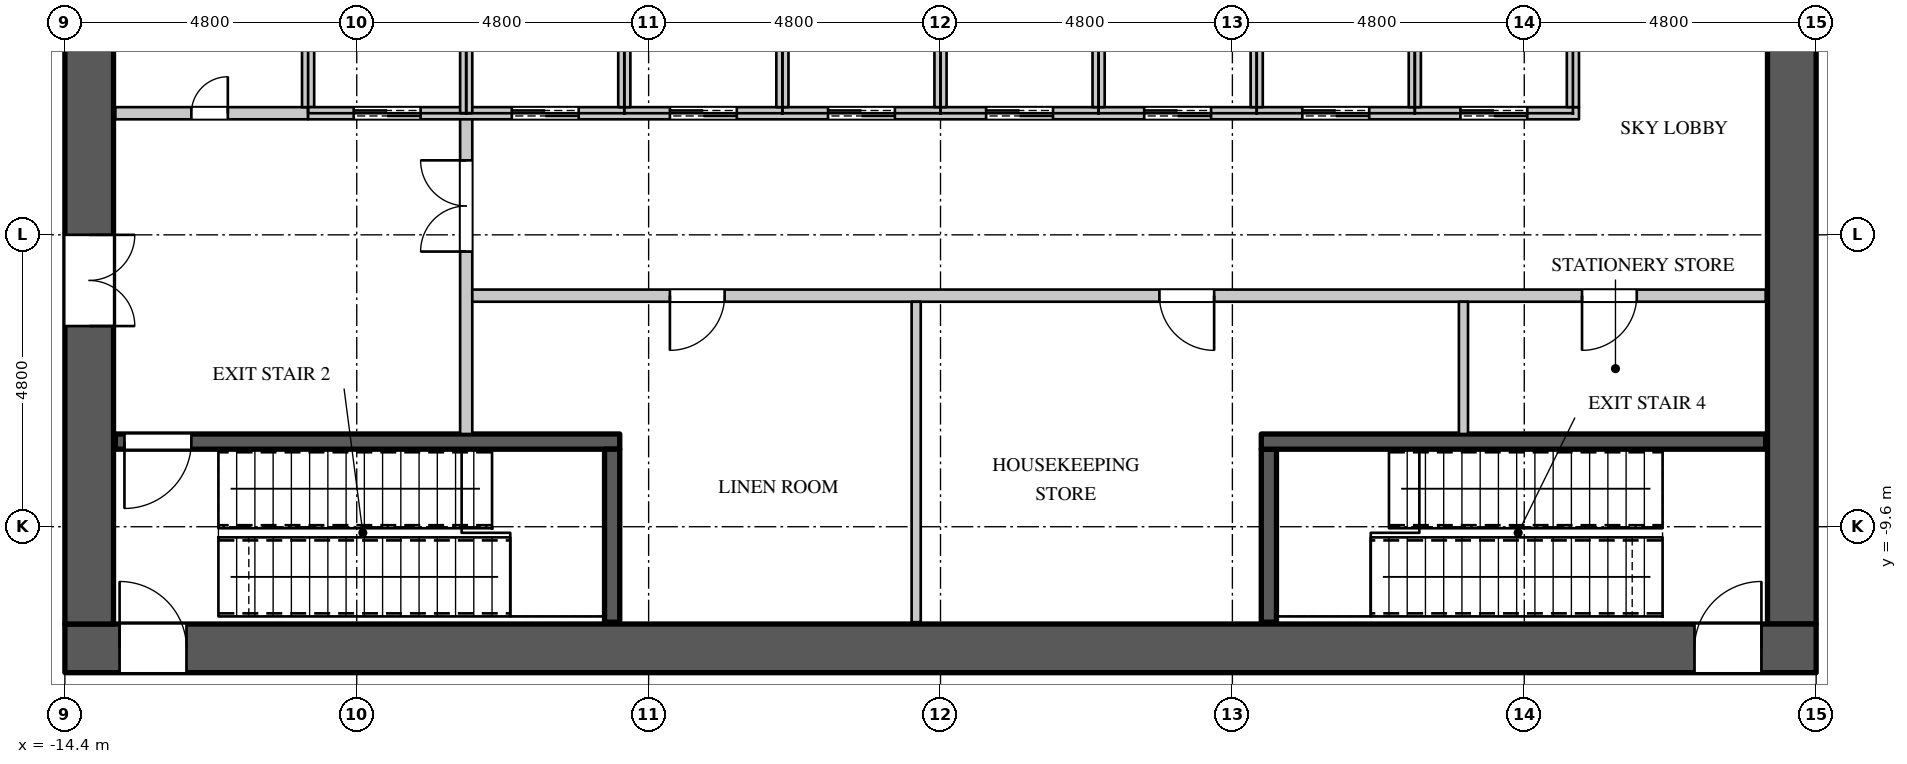
"""IFC4 building model, lengths in metres.
Left out: names, types, materials, properties, quantities, classifications, styles, units other than length and angle.
Written with IfcOpenShell. Run it as: python <this file> out.ifc"""

import sys

from ifc_helpers import new_model, si_unit, direction, frame, frame_2d, origin, place, context, subcontext, project, spatial, rectangle, extrude, element, fill, save


model = new_model("IFC4")
c1 = context("Model", 3, precision=1e-05, world=origin(), true_north=direction((0.0, 1.0)))
c2 = subcontext(c1, "Body", "Model", "MODEL_VIEW")
j1 = project(units=[si_unit("LENGTHUNIT", "METRE"), si_unit("PLANEANGLEUNIT", "RADIAN")], contexts=[c1])
p1 = place(None, origin())
s1 = spatial("IfcSite", under=j1, at=p1, CompositionType="ELEMENT")
p2 = place(p1, origin())
s2 = spatial("IfcBuilding", under=s1, at=p2, CompositionType="ELEMENT")
p3 = place(p2, frame((0.0, 0.0, 156.9)))
s3 = spatial("IfcBuildingStorey", under=s2, at=p3, CompositionType="ELEMENT", Elevation=156.9)
p4 = place(p3, frame((-14.4, -11.6, 0.0), z_axis=(0.0, 0.0, 1.0), x_axis=(1.0, 0.0, 0.0)))
e1 = element("IfcWall", 1, at=p4, inside=s3, PredefinedType="SHEAR", context=c2, shape_type="SweptSolid", body=[
    extrude(rectangle(XDim=28.8, YDim=0.8, at=frame_2d((14.4, 0.0))), origin(), (0.0, 0.0, 1.0), 5.4),
])
p5 = place(p4, frame((0.9, 0.0, 0.0)))
e2 = element("IfcOpeningElement", 2, at=p5, cuts=e1, PredefinedType="OPENING", context=c2, shape_type="SweptSolid", body=[
    extrude(rectangle(XDim=1.1, YDim=2.2, at=frame_2d((0.55, 1.1))), frame((0.0, 0.41, 0.0), z_axis=(0.0, -1.0, 0.0), x_axis=(1.0, 0.0, 0.0)), (0.0, 0.0, 1.0), 0.82),
])
p6 = place(p4, frame((26.8, 0.0, 0.0)))
e3 = element("IfcOpeningElement", 3, at=p6, cuts=e1, PredefinedType="OPENING", context=c2, shape_type="SweptSolid", body=[
    extrude(rectangle(XDim=1.1, YDim=2.2, at=frame_2d((0.55, 1.1))), frame((0.0, 0.41, 0.0), z_axis=(0.0, -1.0, 0.0), x_axis=(1.0, 0.0, 0.0)), (0.0, 0.0, 1.0), 0.82),
])
p7 = place(p3, frame((14.0, -11.2, 0.0), z_axis=(0.0, 0.0, 1.0), x_axis=(0.0, 1.0, 0.0)))
e4 = element("IfcWall", 4, at=p7, inside=s3, PredefinedType="SHEAR", context=c2, shape_type="SweptSolid", body=[
    extrude(rectangle(XDim=22.4, YDim=0.8, at=frame_2d((11.2, 0.0))), origin(), (0.0, 0.0, 1.0), 5.4),
])
p8 = place(p7, frame((10.4, 0.0, 0.0)))
e5 = element("IfcOpeningElement", 5, at=p8, cuts=e4, PredefinedType="OPENING", context=c2, shape_type="SweptSolid", body=[
    extrude(rectangle(XDim=1.5, YDim=2.4, at=frame_2d((0.75, 1.2))), frame((0.0, 0.41, 0.0), z_axis=(0.0, -1.0, 0.0), x_axis=(1.0, 0.0, 0.0)), (0.0, 0.0, 1.0), 0.82),
])
p9 = place(p3, frame((-14.0, -11.2, 0.0), z_axis=(0.0, 0.0, 1.0), x_axis=(0.0, 1.0, 0.0)))
e6 = element("IfcWall", 6, at=p9, inside=s3, PredefinedType="SHEAR", context=c2, shape_type="SweptSolid", body=[
    extrude(rectangle(XDim=22.4, YDim=0.8, at=frame_2d((11.2, 0.0))), origin(), (0.0, 0.0, 1.0), 5.4),
])
p10 = place(p9, frame((15.9, 0.0, 0.0)))
e7 = element("IfcOpeningElement", 7, at=p10, cuts=e6, PredefinedType="OPENING", context=c2, shape_type="SweptSolid", body=[
    extrude(rectangle(XDim=1.5, YDim=2.4, at=frame_2d((0.75, 1.2))), frame((0.0, 0.41, 0.0), z_axis=(0.0, -1.0, 0.0), x_axis=(1.0, 0.0, 0.0)), (0.0, 0.0, 1.0), 0.82),
])
p11 = place(p9, frame((4.9, 0.0, 0.0)))
e8 = element("IfcOpeningElement", 8, at=p11, cuts=e6, PredefinedType="OPENING", context=c2, shape_type="SweptSolid", body=[
    extrude(rectangle(XDim=1.5, YDim=2.4, at=frame_2d((0.75, 1.2))), frame((0.0, 0.41, 0.0), z_axis=(0.0, -1.0, 0.0), x_axis=(1.0, 0.0, 0.0)), (0.0, 0.0, 1.0), 0.82),
])
p12 = place(p3, frame((-7.8, -8.075, 0.0), z_axis=(0.0, 0.0, 1.0), x_axis=(0.0, 1.0, 0.0)))
e9 = element("IfcWall", 9, at=p12, inside=s3, PredefinedType="PARTITIONING", context=c2, shape_type="SweptSolid", body=[
    extrude(rectangle(XDim=5.275, YDim=0.2, at=frame_2d((2.637, 0.0))), origin(), (0.0, 0.0, 1.0), 5.1),
])
p13 = place(p12, frame((3.0, 0.0, 0.0)))
e10 = element("IfcOpeningElement", 10, at=p13, cuts=e9, PredefinedType="OPENING", context=c2, shape_type="SweptSolid", body=[
    extrude(rectangle(XDim=1.5, YDim=2.4, at=frame_2d((0.75, 1.2))), frame((0.0, 0.11, 0.0), z_axis=(0.0, -1.0, 0.0), x_axis=(1.0, 0.0, 0.0)), (0.0, 0.0, 1.0), 0.22),
])
p14 = place(p3, frame((-7.7, -5.8, 0.0), z_axis=(0.0, 0.0, 1.0), x_axis=(1.0, 0.0, 0.0)))
e11 = element("IfcWall", 11, at=p14, inside=s3, PredefinedType="PARTITIONING", context=c2, shape_type="SweptSolid", body=[
    extrude(rectangle(XDim=21.27, YDim=0.2, at=frame_2d((10.635, 0.0))), origin(), (0.0, 0.0, 1.0), 5.1),
])
p15 = place(p14, frame((3.25, 0.0, 0.0)))
e12 = element("IfcOpeningElement", 12, at=p15, cuts=e11, PredefinedType="OPENING", context=c2, shape_type="SweptSolid", body=[
    extrude(rectangle(XDim=0.9, YDim=2.2, at=frame_2d((0.45, 1.1))), frame((0.0, 0.11, 0.0), z_axis=(0.0, -1.0, 0.0), x_axis=(1.0, 0.0, 0.0)), (0.0, 0.0, 1.0), 0.22),
])
p16 = place(p14, frame((11.3, 0.0, 0.0)))
e13 = element("IfcOpeningElement", 13, at=p16, cuts=e11, PredefinedType="OPENING", context=c2, shape_type="SweptSolid", body=[
    extrude(rectangle(XDim=0.9, YDim=2.2, at=frame_2d((0.45, 1.1))), frame((0.0, 0.11, 0.0), z_axis=(0.0, -1.0, 0.0), x_axis=(1.0, 0.0, 0.0)), (0.0, 0.0, 1.0), 0.22),
])
p17 = place(p14, frame((18.25, 0.0, 0.0)))
e14 = element("IfcOpeningElement", 14, at=p17, cuts=e11, PredefinedType="OPENING", context=c2, shape_type="SweptSolid", body=[
    extrude(rectangle(XDim=0.9, YDim=2.2, at=frame_2d((0.45, 1.1))), frame((0.0, 0.11, 0.0), z_axis=(0.0, -1.0, 0.0), x_axis=(1.0, 0.0, 0.0)), (0.0, 0.0, 1.0), 0.22),
])
p18 = place(p3, frame((-0.4, -11.17, 0.0), z_axis=(0.0, 0.0, 1.0), x_axis=(0.0, 1.0, 0.0)))
e15 = element("IfcWall", 15, at=p18, inside=s3, PredefinedType="PARTITIONING", context=c2, shape_type="SweptSolid", body=[
    extrude(rectangle(XDim=5.27, YDim=0.15, at=frame_2d((2.635, 0.0))), origin(), (0.0, 0.0, 1.0), 5.1),
])
p19 = place(p3, frame((8.6, -8.075, 0.0), z_axis=(0.0, 0.0, 1.0), x_axis=(0.0, 1.0, 0.0)))
e16 = element("IfcWall", 16, at=p19, inside=s3, PredefinedType="PARTITIONING", context=c2, shape_type="SweptSolid", body=[
    extrude(rectangle(XDim=2.175, YDim=0.15, at=frame_2d((1.087, 0.0))), origin(), (0.0, 0.0, 1.0), 5.1),
])
p20 = place(p3, frame((-13.57, -2.8, 0.0), z_axis=(0.0, 0.0, 1.0), x_axis=(1.0, 0.0, 0.0)))
e17 = element("IfcWall", 17, at=p20, inside=s3, PredefinedType="PARTITIONING", context=c2, shape_type="SweptSolid", body=[
    extrude(rectangle(XDim=3.17, YDim=0.2, at=frame_2d((1.585, 0.0))), origin(), (0.0, 0.0, 1.0), 5.1),
])
p21 = place(p20, frame((1.25, 0.0, 0.0)))
e18 = element("IfcOpeningElement", 18, at=p21, cuts=e17, PredefinedType="OPENING", context=c2, shape_type="SweptSolid", body=[
    extrude(rectangle(XDim=0.6, YDim=2.0, at=frame_2d((0.3, 1.0))), frame((0.0, 0.11, 0.0), z_axis=(0.0, -1.0, 0.0), x_axis=(1.0, 0.0, 0.0)), (0.0, 0.0, 1.0), 0.22),
])
p22 = place(p3, frame((-10.4, -2.7, 0.0), z_axis=(0.0, 0.0, 1.0), x_axis=(0.0, 1.0, 0.0)))
e19 = element("IfcWall", 19, at=p22, inside=s3, PredefinedType="PARTITIONING", context=c2, shape_type="SweptSolid", body=[
    extrude(rectangle(XDim=2.7, YDim=0.2, at=frame_2d((1.35, 0.0))), origin(), (0.0, 0.0, 1.0), 5.1),
])
p23 = place(p3, frame((-10.4, -2.8, 0.0), z_axis=(0.0, 0.0, 1.0), x_axis=(1.0, 0.0, 0.0)))
e20 = element("IfcWall", 20, at=p23, inside=s3, PredefinedType="PARTITIONING", context=c2, shape_type="SweptSolid", body=[
    extrude(rectangle(XDim=20.9, YDim=0.2, at=frame_2d((10.45, 0.0))), origin(), (0.0, 0.0, 1.0), 5.1),
])
p24 = place(p23, frame((0.75, 0.0, 0.0)))
e21 = element("IfcOpeningElement", 21, at=p24, cuts=e20, PredefinedType="OPENING", context=c2, shape_type="SweptSolid", body=[
    extrude(rectangle(XDim=1.1, YDim=2.2, at=frame_2d((0.55, 1.1))), frame((0.0, 0.11, 0.0), z_axis=(0.0, -1.0, 0.0), x_axis=(1.0, 0.0, 0.0)), (0.0, 0.0, 1.0), 0.22),
])
p25 = place(p23, frame((3.35, 0.0, 0.0)))
e22 = element("IfcOpeningElement", 22, at=p25, cuts=e20, PredefinedType="OPENING", context=c2, shape_type="SweptSolid", body=[
    extrude(rectangle(XDim=1.1, YDim=2.2, at=frame_2d((0.55, 1.1))), frame((0.0, 0.11, 0.0), z_axis=(0.0, -1.0, 0.0), x_axis=(1.0, 0.0, 0.0)), (0.0, 0.0, 1.0), 0.22),
])
p26 = place(p23, frame((5.95, 0.0, 0.0)))
e23 = element("IfcOpeningElement", 23, at=p26, cuts=e20, PredefinedType="OPENING", context=c2, shape_type="SweptSolid", body=[
    extrude(rectangle(XDim=1.1, YDim=2.2, at=frame_2d((0.55, 1.1))), frame((0.0, 0.11, 0.0), z_axis=(0.0, -1.0, 0.0), x_axis=(1.0, 0.0, 0.0)), (0.0, 0.0, 1.0), 0.22),
])
p27 = place(p23, frame((8.55, 0.0, 0.0)))
e24 = element("IfcOpeningElement", 24, at=p27, cuts=e20, PredefinedType="OPENING", context=c2, shape_type="SweptSolid", body=[
    extrude(rectangle(XDim=1.1, YDim=2.2, at=frame_2d((0.55, 1.1))), frame((0.0, 0.11, 0.0), z_axis=(0.0, -1.0, 0.0), x_axis=(1.0, 0.0, 0.0)), (0.0, 0.0, 1.0), 0.22),
])
p28 = place(p23, frame((11.15, 0.0, 0.0)))
e25 = element("IfcOpeningElement", 25, at=p28, cuts=e20, PredefinedType="OPENING", context=c2, shape_type="SweptSolid", body=[
    extrude(rectangle(XDim=1.1, YDim=2.2, at=frame_2d((0.55, 1.1))), frame((0.0, 0.11, 0.0), z_axis=(0.0, -1.0, 0.0), x_axis=(1.0, 0.0, 0.0)), (0.0, 0.0, 1.0), 0.22),
])
p29 = place(p23, frame((13.75, 0.0, 0.0)))
e26 = element("IfcOpeningElement", 26, at=p29, cuts=e20, PredefinedType="OPENING", context=c2, shape_type="SweptSolid", body=[
    extrude(rectangle(XDim=1.1, YDim=2.2, at=frame_2d((0.55, 1.1))), frame((0.0, 0.11, 0.0), z_axis=(0.0, -1.0, 0.0), x_axis=(1.0, 0.0, 0.0)), (0.0, 0.0, 1.0), 0.22),
])
p30 = place(p23, frame((16.35, 0.0, 0.0)))
e27 = element("IfcOpeningElement", 27, at=p30, cuts=e20, PredefinedType="OPENING", context=c2, shape_type="SweptSolid", body=[
    extrude(rectangle(XDim=1.1, YDim=2.2, at=frame_2d((0.55, 1.1))), frame((0.0, 0.11, 0.0), z_axis=(0.0, -1.0, 0.0), x_axis=(1.0, 0.0, 0.0)), (0.0, 0.0, 1.0), 0.22),
])
p31 = place(p23, frame((18.95, 0.0, 0.0)))
e28 = element("IfcOpeningElement", 28, at=p31, cuts=e20, PredefinedType="OPENING", context=c2, shape_type="SweptSolid", body=[
    extrude(rectangle(XDim=1.1, YDim=2.2, at=frame_2d((0.55, 1.1))), frame((0.0, 0.11, 0.0), z_axis=(0.0, -1.0, 0.0), x_axis=(1.0, 0.0, 0.0)), (0.0, 0.0, 1.0), 0.22),
])
p32 = place(p3, frame((-7.8, -2.8, 0.0), z_axis=(0.0, 0.0, 1.0), x_axis=(0.0, 1.0, 0.0)))
e29 = element("IfcWall", 29, at=p32, inside=s3, PredefinedType="PARTITIONING", context=c2, shape_type="SweptSolid", body=[
    extrude(rectangle(XDim=2.8, YDim=0.2, at=frame_2d((1.4, 0.0))), origin(), (0.0, 0.0, 1.0), 5.1),
])
for number, where, z_axis, x_axis in (
    (30, (-5.2, -2.7, 0.0), (0.0, 0.0, 1.0), (0.0, 1.0, 0.0)),
    (31, (-2.6, -2.7, 0.0), (0.0, 0.0, 1.0), (0.0, 1.0, 0.0)),
    (32, (0.0, -2.7, 0.0), (0.0, 0.0, 1.0), (0.0, 1.0, 0.0)),
    (33, (2.6, -2.7, 0.0), (0.0, 0.0, 1.0), (0.0, 1.0, 0.0)),
    (34, (5.2, -2.7, 0.0), (0.0, 0.0, 1.0), (0.0, 1.0, 0.0)),
):
    element("IfcWall", number, at=place(p3, frame(where, z_axis=z_axis, x_axis=x_axis)), inside=s3, PredefinedType="PARTITIONING", context=c2, shape_type="SweptSolid", body=[
        extrude(rectangle(XDim=2.6, YDim=0.2, at=frame_2d((1.3, 0.0))), origin(), (0.0, 0.0, 1.0), 5.1),
    ])
p33 = place(p3, frame((7.8, -2.7, 0.0), z_axis=(0.0, 0.0, 1.0), x_axis=(0.0, 1.0, 0.0)))
e35 = element("IfcWall", 35, at=p33, inside=s3, PredefinedType="PARTITIONING", context=c2, shape_type="SweptSolid", body=[
    extrude(rectangle(XDim=2.7, YDim=0.2, at=frame_2d((1.35, 0.0))), origin(), (0.0, 0.0, 1.0), 5.1),
])
p34 = place(p3, frame((10.4, -2.7, 0.0), z_axis=(0.0, 0.0, 1.0), x_axis=(0.0, 1.0, 0.0)))
e36 = element("IfcWall", 36, at=p34, inside=s3, PredefinedType="PARTITIONING", context=c2, shape_type="SweptSolid", body=[
    extrude(rectangle(XDim=5.4, YDim=0.2, at=frame_2d((2.7, 0.0))), origin(), (0.0, 0.0, 1.0), 5.1),
])
p35 = place(p3, frame((-13.57, -8.2, 0.0), z_axis=(0.0, 0.0, 1.0), x_axis=(1.0, 0.0, 0.0)))
e37 = element("IfcWall", 37, at=p35, inside=s3, PredefinedType="SHEAR", context=c2, shape_type="SweptSolid", body=[
    extrude(rectangle(XDim=8.295, YDim=0.25, at=frame_2d((4.147, 0.0))), origin(), (0.0, 0.0, 1.0), 5.15),
])
p36 = place(p35, frame((0.15, 0.0, 0.0)))
e38 = element("IfcOpeningElement", 38, at=p36, cuts=e37, PredefinedType="OPENING", context=c2, shape_type="SweptSolid", body=[
    extrude(rectangle(XDim=1.1, YDim=2.2, at=frame_2d((0.55, 1.1))), frame((0.0, 0.135, 0.0), z_axis=(0.0, -1.0, 0.0), x_axis=(1.0, 0.0, 0.0)), (0.0, 0.0, 1.0), 0.27),
])
for number, where, z_axis, x_axis in (
    (39, (-5.4, -11.17, 0.0), (0.0, 0.0, 1.0), (0.0, 1.0, 0.0)),
    (40, (5.4, -11.17, 0.0), (0.0, 0.0, 1.0), (0.0, 1.0, 0.0)),
):
    element("IfcWall", number, at=place(p3, frame(where, z_axis=z_axis, x_axis=x_axis)), inside=s3, PredefinedType="SHEAR", context=c2, shape_type="SweptSolid", body=[
        extrude(rectangle(XDim=2.845, YDim=0.25, at=frame_2d((1.422, 0.0))), origin(), (0.0, 0.0, 1.0), 5.15),
    ])
p37 = place(p3, frame((5.275, -8.2, 0.0), z_axis=(0.0, 0.0, 1.0), x_axis=(1.0, 0.0, 0.0)))
e41 = element("IfcWall", 41, at=p37, inside=s3, PredefinedType="SHEAR", context=c2, shape_type="SweptSolid", body=[
    extrude(rectangle(XDim=8.295, YDim=0.25, at=frame_2d((4.147, 0.0))), origin(), (0.0, 0.0, 1.0), 5.15),
])
p38 = place(p21, origin())
e42 = element("IfcDoor", 42, at=p38, inside=s3, OperationType="SINGLE_SWING_RIGHT", PredefinedType="DOOR", context=c2, shape_type="SweptSolid", body=[
    extrude(rectangle(XDim=0.6, YDim=2.0, at=frame_2d((0.3, 1.0))), frame((0.0, 0.025, 0.0), z_axis=(0.0, -1.0, 0.0), x_axis=(1.0, 0.0, 0.0)), (0.0, 0.0, 1.0), 0.05),
])
fill(e18, e42)
p39 = place(p15, origin())
e43 = element("IfcDoor", 43, at=p39, inside=s3, OperationType="SINGLE_SWING_RIGHT", PredefinedType="DOOR", context=c2, shape_type="SweptSolid", body=[
    extrude(rectangle(XDim=0.9, YDim=2.2, at=frame_2d((0.45, 1.1))), frame((0.0, 0.025, 0.0), z_axis=(0.0, -1.0, 0.0), x_axis=(1.0, 0.0, 0.0)), (0.0, 0.0, 1.0), 0.05),
])
fill(e12, e43)
p40 = place(p16, origin())
e44 = element("IfcDoor", 44, at=p40, inside=s3, OperationType="SINGLE_SWING_LEFT", PredefinedType="DOOR", context=c2, shape_type="SweptSolid", body=[
    extrude(rectangle(XDim=0.9, YDim=2.2, at=frame_2d((0.45, 1.1))), frame((0.0, 0.025, 0.0), z_axis=(0.0, -1.0, 0.0), x_axis=(1.0, 0.0, 0.0)), (0.0, 0.0, 1.0), 0.05),
])
fill(e13, e44)
p41 = place(p17, origin())
e45 = element("IfcDoor", 45, at=p41, inside=s3, OperationType="SINGLE_SWING_RIGHT", PredefinedType="DOOR", context=c2, shape_type="SweptSolid", body=[
    extrude(rectangle(XDim=0.9, YDim=2.2, at=frame_2d((0.45, 1.1))), frame((0.0, 0.025, 0.0), z_axis=(0.0, -1.0, 0.0), x_axis=(1.0, 0.0, 0.0)), (0.0, 0.0, 1.0), 0.05),
])
fill(e14, e45)
p42 = place(p24, origin())
e46 = element("IfcDoor", 46, at=p42, inside=s3, OperationType="DOUBLE_DOOR_SLIDING", PredefinedType="DOOR", context=c2, shape_type="SweptSolid", body=[
    extrude(rectangle(XDim=1.1, YDim=2.2, at=frame_2d((0.55, 1.1))), frame((0.0, 0.025, 0.0), z_axis=(0.0, -1.0, 0.0), x_axis=(1.0, 0.0, 0.0)), (0.0, 0.0, 1.0), 0.05),
])
fill(e21, e46)
p43 = place(p25, origin())
e47 = element("IfcDoor", 47, at=p43, inside=s3, OperationType="DOUBLE_DOOR_SLIDING", PredefinedType="DOOR", context=c2, shape_type="SweptSolid", body=[
    extrude(rectangle(XDim=1.1, YDim=2.2, at=frame_2d((0.55, 1.1))), frame((0.0, 0.025, 0.0), z_axis=(0.0, -1.0, 0.0), x_axis=(1.0, 0.0, 0.0)), (0.0, 0.0, 1.0), 0.05),
])
fill(e22, e47)
p44 = place(p26, origin())
e48 = element("IfcDoor", 48, at=p44, inside=s3, OperationType="DOUBLE_DOOR_SLIDING", PredefinedType="DOOR", context=c2, shape_type="SweptSolid", body=[
    extrude(rectangle(XDim=1.1, YDim=2.2, at=frame_2d((0.55, 1.1))), frame((0.0, 0.025, 0.0), z_axis=(0.0, -1.0, 0.0), x_axis=(1.0, 0.0, 0.0)), (0.0, 0.0, 1.0), 0.05),
])
fill(e23, e48)
p45 = place(p27, origin())
e49 = element("IfcDoor", 49, at=p45, inside=s3, OperationType="DOUBLE_DOOR_SLIDING", PredefinedType="DOOR", context=c2, shape_type="SweptSolid", body=[
    extrude(rectangle(XDim=1.1, YDim=2.2, at=frame_2d((0.55, 1.1))), frame((0.0, 0.025, 0.0), z_axis=(0.0, -1.0, 0.0), x_axis=(1.0, 0.0, 0.0)), (0.0, 0.0, 1.0), 0.05),
])
fill(e24, e49)
p46 = place(p28, origin())
e50 = element("IfcDoor", 50, at=p46, inside=s3, OperationType="DOUBLE_DOOR_SLIDING", PredefinedType="DOOR", context=c2, shape_type="SweptSolid", body=[
    extrude(rectangle(XDim=1.1, YDim=2.2, at=frame_2d((0.55, 1.1))), frame((0.0, 0.025, 0.0), z_axis=(0.0, -1.0, 0.0), x_axis=(1.0, 0.0, 0.0)), (0.0, 0.0, 1.0), 0.05),
])
fill(e25, e50)
p47 = place(p29, origin())
e51 = element("IfcDoor", 51, at=p47, inside=s3, OperationType="DOUBLE_DOOR_SLIDING", PredefinedType="DOOR", context=c2, shape_type="SweptSolid", body=[
    extrude(rectangle(XDim=1.1, YDim=2.2, at=frame_2d((0.55, 1.1))), frame((0.0, 0.025, 0.0), z_axis=(0.0, -1.0, 0.0), x_axis=(1.0, 0.0, 0.0)), (0.0, 0.0, 1.0), 0.05),
])
fill(e26, e51)
p48 = place(p30, origin())
e52 = element("IfcDoor", 52, at=p48, inside=s3, OperationType="DOUBLE_DOOR_SLIDING", PredefinedType="DOOR", context=c2, shape_type="SweptSolid", body=[
    extrude(rectangle(XDim=1.1, YDim=2.2, at=frame_2d((0.55, 1.1))), frame((0.0, 0.025, 0.0), z_axis=(0.0, -1.0, 0.0), x_axis=(1.0, 0.0, 0.0)), (0.0, 0.0, 1.0), 0.05),
])
fill(e27, e52)
p49 = place(p31, origin())
e53 = element("IfcDoor", 53, at=p49, inside=s3, OperationType="DOUBLE_DOOR_SLIDING", PredefinedType="DOOR", context=c2, shape_type="SweptSolid", body=[
    extrude(rectangle(XDim=1.1, YDim=2.2, at=frame_2d((0.55, 1.1))), frame((0.0, 0.025, 0.0), z_axis=(0.0, -1.0, 0.0), x_axis=(1.0, 0.0, 0.0)), (0.0, 0.0, 1.0), 0.05),
])
fill(e28, e53)
p50 = place(p36, origin())
e54 = element("IfcDoor", 54, at=p50, inside=s3, OperationType="SINGLE_SWING_RIGHT", PredefinedType="DOOR", context=c2, shape_type="SweptSolid", body=[
    extrude(rectangle(XDim=1.1, YDim=2.2, at=frame_2d((0.55, 1.1))), frame((0.0, 0.025, 0.0), z_axis=(0.0, -1.0, 0.0), x_axis=(1.0, 0.0, 0.0)), (0.0, 0.0, 1.0), 0.05),
])
fill(e38, e54)
p51 = place(p13, origin())
e55 = element("IfcDoor", 55, at=p51, inside=s3, OperationType="DOUBLE_DOOR_SINGLE_SWING", PredefinedType="DOOR", context=c2, shape_type="SweptSolid", body=[
    extrude(rectangle(XDim=1.5, YDim=2.4, at=frame_2d((0.75, 1.2))), frame((0.0, 0.025, 0.0), z_axis=(0.0, -1.0, 0.0), x_axis=(1.0, 0.0, 0.0)), (0.0, 0.0, 1.0), 0.05),
])
fill(e10, e55)
p52 = place(p11, origin())
e56 = element("IfcDoor", 56, at=p52, inside=s3, OperationType="DOUBLE_DOOR_SINGLE_SWING", PredefinedType="DOOR", context=c2, shape_type="SweptSolid", body=[
    extrude(rectangle(XDim=1.5, YDim=2.4, at=frame_2d((0.75, 1.2))), frame((0.0, -0.345, 0.0), z_axis=(0.0, -1.0, 0.0), x_axis=(1.0, 0.0, 0.0)), (0.0, 0.0, 1.0), 0.05),
])
fill(e8, e56)
p53 = place(p5, origin())
e57 = element("IfcDoor", 57, at=p53, inside=s3, OperationType="SINGLE_SWING_LEFT", PredefinedType="DOOR", context=c2, shape_type="SweptSolid", body=[
    extrude(rectangle(XDim=1.1, YDim=2.2, at=frame_2d((0.55, 1.1))), frame((0.0, 0.395, 0.0), z_axis=(0.0, -1.0, 0.0), x_axis=(1.0, 0.0, 0.0)), (0.0, 0.0, 1.0), 0.05),
])
fill(e2, e57)
p54 = place(p6, origin())
e58 = element("IfcDoor", 58, at=p54, inside=s3, OperationType="SINGLE_SWING_RIGHT", PredefinedType="DOOR", context=c2, shape_type="SweptSolid", body=[
    extrude(rectangle(XDim=1.1, YDim=2.2, at=frame_2d((0.55, 1.1))), frame((0.0, 0.395, 0.0), z_axis=(0.0, -1.0, 0.0), x_axis=(1.0, 0.0, 0.0)), (0.0, 0.0, 1.0), 0.05),
])
fill(e3, e58)
save(model, sys.argv[1])
